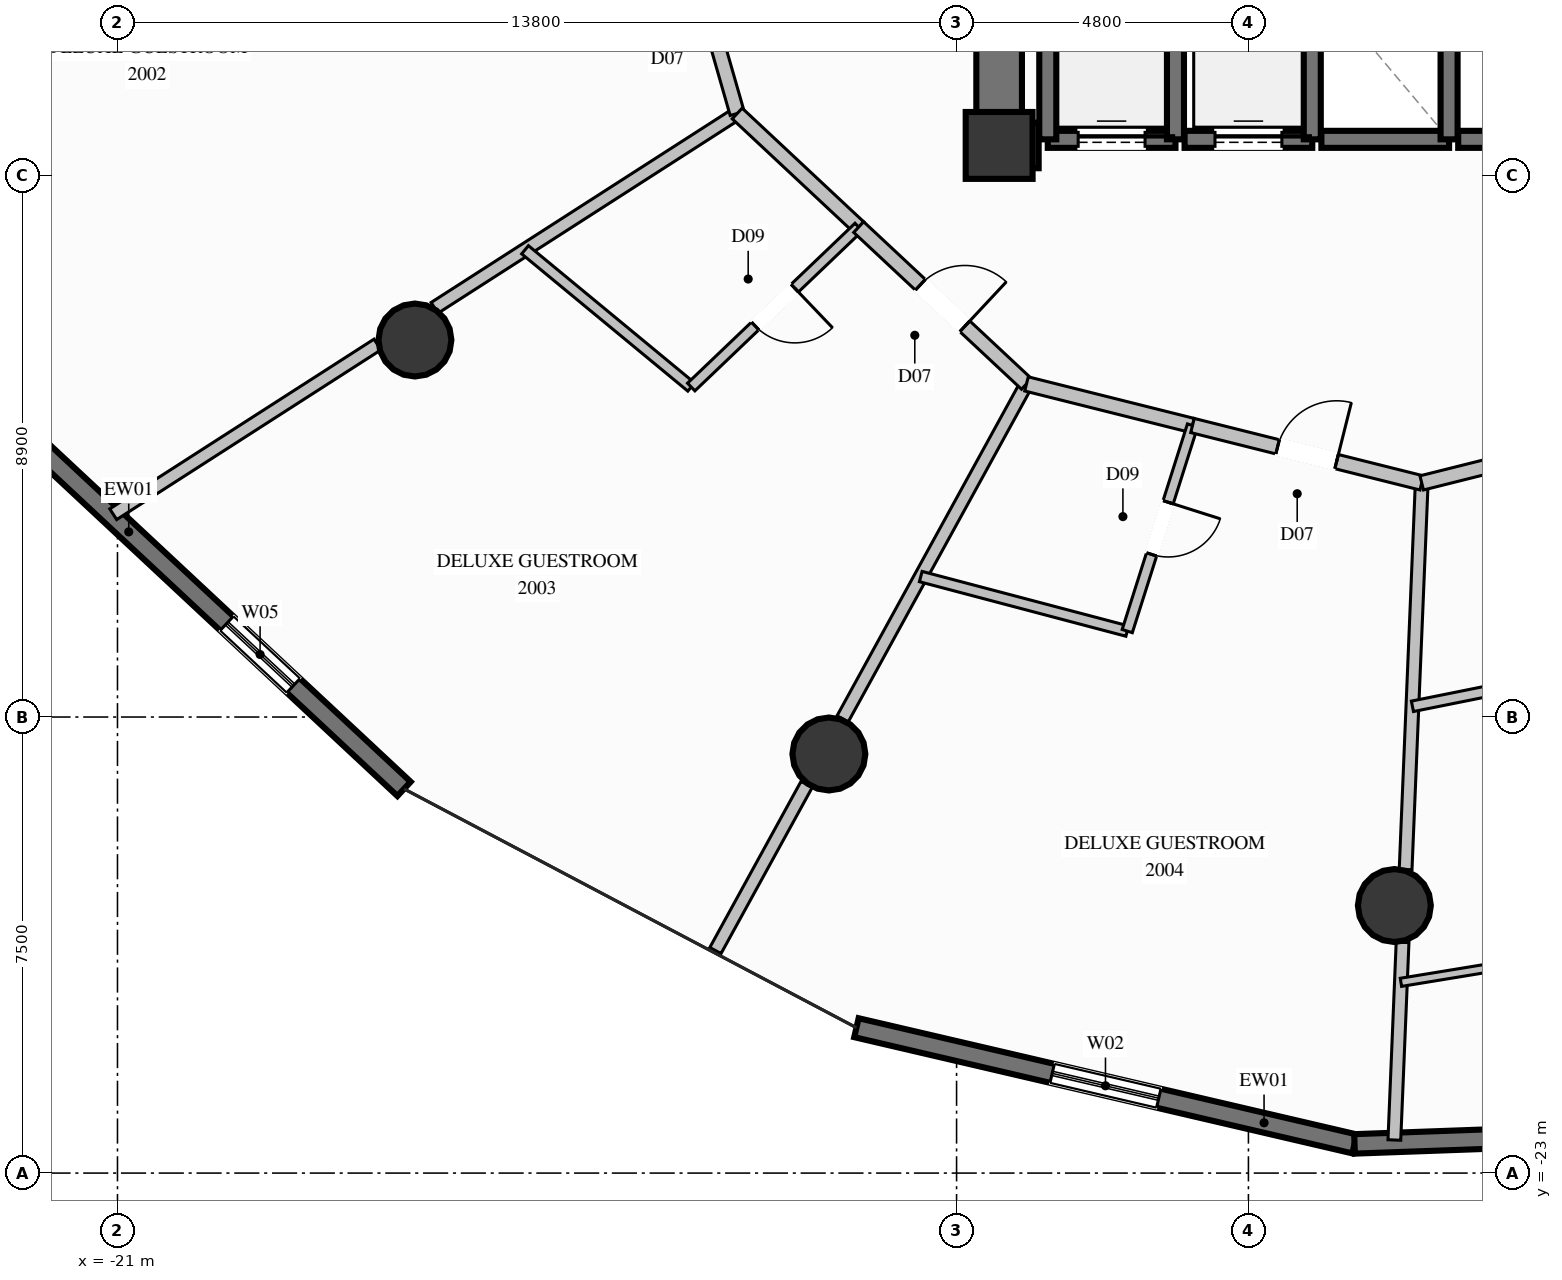
"""IFC4 building model, lengths in metres.
Left out: names, types, materials, properties, quantities, classifications, styles, units other than length and angle.
Written with IfcOpenShell. Run it as: python <this file> out.ifc"""

import sys

from ifc_helpers import new_model, si_unit, direction, frame, frame_2d, origin, origin_2d, place, context, subcontext, project, spatial, rectangle, circle, extrude, element, fill, save


model = new_model("IFC4")
c1 = context("Model", 3, precision=1e-05, world=origin(), true_north=direction((0.0, 1.0)))
c2 = subcontext(c1, "Body", "Model", "MODEL_VIEW")
j1 = project(units=[si_unit("LENGTHUNIT", "METRE"), si_unit("PLANEANGLEUNIT", "RADIAN")], contexts=[c1])
p1 = place(None, origin())
s1 = spatial("IfcSite", under=j1, at=p1, CompositionType="ELEMENT")
p2 = place(p1, origin())
s2 = spatial("IfcBuilding", under=s1, at=p2, CompositionType="ELEMENT")
p3 = place(p2, frame((0.0, 0.0, 75.2)))
s3 = spatial("IfcBuildingStorey", under=s2, at=p3, CompositionType="ELEMENT", Elevation=75.2)
p4 = place(p3, frame((-6.5, -6.1, 0.0), z_axis=(0.0, 0.0, 1.0), x_axis=(1.0, 0.0, 0.0)))
e1 = element("IfcColumn", 1, at=p4, inside=s3, PredefinedType="COLUMN", context=c2, shape_type="SweptSolid", body=[
    extrude(rectangle(XDim=1.1, YDim=1.1, at=origin_2d()), origin(), (0.0, 0.0, 1.0), 3.6),
])
p5 = place(p3, frame((-6.125, -6.1, 0.0), z_axis=(0.0, 0.0, 1.0), x_axis=(1.0, 0.0, 0.0)))
e2 = element("IfcWall", 2, at=p5, inside=s3, PredefinedType="SHEAR", context=c2, shape_type="SweptSolid", body=[
    extrude(rectangle(XDim=0.275, YDim=0.75, at=frame_2d((0.137, 0.0))), origin(), (0.0, 0.0, 1.0), 3.6),
])
p6 = place(p3, frame((-6.5, -6.475, 0.0), z_axis=(0.0, 0.0, 1.0), x_axis=(0.0, 1.0, 0.0)))
e3 = element("IfcWall", 3, at=p6, inside=s3, PredefinedType="SHEAR", context=c2, shape_type="SweptSolid", body=[
    extrude(rectangle(XDim=3.125, YDim=0.75, at=frame_2d((1.562, 0.0))), origin(), (0.0, 0.0, 1.0), 3.6),
])
for number, where, z_axis, x_axis in (
    (4, (-16.108, -9.3, 0.0), (0.0, 0.0, 1.0), (1.0, 0.0, 0.0)),
    (5, (-9.3, -16.108, 0.0), (0.0, 0.0, 1.0), (1.0, 0.0, 0.0)),
    (6, (0.0, -18.6, 0.0), (0.0, 0.0, 1.0), (1.0, 0.0, 0.0)),
):
    element("IfcColumn", number, at=place(p3, frame(where, z_axis=z_axis, x_axis=x_axis)), inside=s3, PredefinedType="COLUMN", context=c2, shape_type="SweptSolid", body=[
        extrude(circle(Radius=0.6, at=origin_2d()), origin(), (0.0, 0.0, 1.0), 3.6),
    ])
p7 = place(p3, frame((-16.287, -16.682, 0.0), z_axis=(0.0, 0.0, 1.0), x_axis=(-0.730986520917, 0.682391900771, 0.0)))
e7 = element("IfcWall", 7, at=p7, inside=s3, PredefinedType="SOLIDWALL", context=c2, shape_type="SweptSolid", body=[
    extrude(rectangle(XDim=8.149, YDim=0.32, at=frame_2d((4.074, 0.0))), origin(), (0.0, 0.0, 1.0), 3.34),
])
p8 = place(p7, frame((2.489, 0.0, 0.85)))
e8 = element("IfcOpeningElement", 8, at=p8, cuts=e7, PredefinedType="OPENING", context=c2, shape_type="SweptSolid", body=[
    extrude(rectangle(XDim=1.5, YDim=1.2, at=frame_2d((0.75, 0.6))), frame((0.0, 0.17, 0.0), z_axis=(0.0, -1.0, 0.0), x_axis=(1.0, 0.0, 0.0)), (0.0, 0.0, 1.0), 0.34),
])
p9 = place(p3, frame((-0.655, -22.52, 0.0), z_axis=(0.0, 0.0, 1.0), x_axis=(-0.973849344218, 0.227194750746, 0.0)))
e9 = element("IfcWall", 9, at=p9, inside=s3, PredefinedType="SOLIDWALL", context=c2, shape_type="SweptSolid", body=[
    extrude(rectangle(XDim=8.412, YDim=0.32, at=frame_2d((4.206, 0.0))), origin(), (0.0, 0.0, 1.0), 3.34),
])
p10 = place(p9, frame((3.306, 0.0, 0.35)))
e10 = element("IfcOpeningElement", 10, at=p10, cuts=e9, PredefinedType="OPENING", context=c2, shape_type="SweptSolid", body=[
    extrude(rectangle(XDim=1.8, YDim=2.6, at=frame_2d((0.9, 1.3))), frame((0.0, 0.17, 0.0), z_axis=(0.0, -1.0, 0.0), x_axis=(1.0, 0.0, 0.0)), (0.0, 0.0, 1.0), 0.34),
])
p11 = place(p3, frame((7.49, -22.226, 0.0), z_axis=(0.0, 0.0, 1.0), x_axis=(-0.999349428773, -0.03606548505, 0.0)))
e11 = element("IfcWall", 11, at=p11, inside=s3, PredefinedType="SOLIDWALL", context=c2, shape_type="SweptSolid", body=[
    extrude(rectangle(XDim=8.15, YDim=0.32, at=frame_2d((4.075, 0.0))), origin(), (0.0, 0.0, 1.0), 3.34),
])
p12 = place(p11, frame((2.797, 0.0, 0.35)))
e12 = element("IfcOpeningElement", 12, at=p12, cuts=e11, PredefinedType="OPENING", context=c2, shape_type="SweptSolid", body=[
    extrude(rectangle(XDim=1.8, YDim=2.6, at=frame_2d((0.9, 1.3))), frame((0.0, 0.17, 0.0), z_axis=(0.0, -1.0, 0.0), x_axis=(1.0, 0.0, 0.0)), (0.0, 0.0, 1.0), 0.34),
])
p13 = place(p3, frame((-5.7, -6.0, 0.0), z_axis=(0.0, 0.0, 1.0), x_axis=(1.0, 0.0, 0.0)))
e13 = element("IfcWall", 13, at=p13, inside=s3, PredefinedType="SOLIDWALL", context=c2, shape_type="SweptSolid", body=[
    extrude(rectangle(XDim=2.1, YDim=0.28, at=frame_2d((1.05, 0.0))), origin(), (0.0, 0.0, 1.0), 3.34),
])
p14 = place(p13, frame((0.5, 0.0, 0.0)))
e14 = element("IfcOpeningElement", 14, at=p14, cuts=e13, PredefinedType="OPENING", context=c2, shape_type="SweptSolid", body=[
    extrude(rectangle(XDim=1.1, YDim=2.2, at=frame_2d((0.55, 1.1))), frame((0.0, 0.15, 0.0), z_axis=(0.0, -1.0, 0.0), x_axis=(1.0, 0.0, 0.0)), (0.0, 0.0, 1.0), 0.3),
])
for number, where, z_axis, x_axis in (
    (15, (-5.7, -3.5, 0.0), (0.0, 0.0, 1.0), (0.0, -1.0, 0.0)),
    (16, (-3.6, -6.0, 0.0), (0.0, 0.0, 1.0), (0.0, 1.0, 0.0)),
):
    element("IfcWall", number, at=place(p3, frame(where, z_axis=z_axis, x_axis=x_axis)), inside=s3, PredefinedType="SOLIDWALL", context=c2, shape_type="SweptSolid", body=[
        extrude(rectangle(XDim=2.5, YDim=0.28, at=frame_2d((1.25, 0.0))), origin(), (0.0, 0.0, 1.0), 3.34),
    ])
p15 = place(p3, frame((-3.45, -6.0, 0.0), z_axis=(0.0, 0.0, 1.0), x_axis=(1.0, 0.0, 0.0)))
e17 = element("IfcWall", 17, at=p15, inside=s3, PredefinedType="SOLIDWALL", context=c2, shape_type="SweptSolid", body=[
    extrude(rectangle(XDim=2.1, YDim=0.28, at=frame_2d((1.05, 0.0))), origin(), (0.0, 0.0, 1.0), 3.34),
])
p16 = place(p15, frame((0.5, 0.0, 0.0)))
e18 = element("IfcOpeningElement", 18, at=p16, cuts=e17, PredefinedType="OPENING", context=c2, shape_type="SweptSolid", body=[
    extrude(rectangle(XDim=1.1, YDim=2.2, at=frame_2d((0.55, 1.1))), frame((0.0, 0.15, 0.0), z_axis=(0.0, -1.0, 0.0), x_axis=(1.0, 0.0, 0.0)), (0.0, 0.0, 1.0), 0.3),
])
p17 = place(p3, frame((-1.35, -6.0, 0.0), z_axis=(0.0, 0.0, 1.0), x_axis=(0.0, 1.0, 0.0)))
e19 = element("IfcWall", 19, at=p17, inside=s3, PredefinedType="SOLIDWALL", context=c2, shape_type="SweptSolid", body=[
    extrude(rectangle(XDim=2.5, YDim=0.28, at=frame_2d((1.25, 0.0))), origin(), (0.0, 0.0, 1.0), 3.34),
])
p18 = place(p3, frame((-1.2, -6.0, 0.0), z_axis=(0.0, 0.0, 1.0), x_axis=(1.0, 0.0, 0.0)))
e20 = element("IfcWall", 20, at=p18, inside=s3, PredefinedType="SOLIDWALL", context=c2, shape_type="SweptSolid", body=[
    extrude(rectangle(XDim=2.1, YDim=0.28, at=frame_2d((1.05, 0.0))), origin(), (0.0, 0.0, 1.0), 3.34),
])
p19 = place(p3, frame((0.9, -6.0, 0.0), z_axis=(0.0, 0.0, 1.0), x_axis=(0.0, 1.0, 0.0)))
e21 = element("IfcWall", 21, at=p19, inside=s3, PredefinedType="SOLIDWALL", context=c2, shape_type="SweptSolid", body=[
    extrude(rectangle(XDim=2.5, YDim=0.28, at=frame_2d((1.25, 0.0))), origin(), (0.0, 0.0, 1.0), 3.34),
])
p20 = place(p3, frame((1.05, -6.0, 0.0), z_axis=(0.0, 0.0, 1.0), x_axis=(1.0, 0.0, 0.0)))
e22 = element("IfcWall", 22, at=p20, inside=s3, PredefinedType="SOLIDWALL", context=c2, shape_type="SweptSolid", body=[
    extrude(rectangle(XDim=2.1, YDim=0.28, at=frame_2d((1.05, 0.0))), origin(), (0.0, 0.0, 1.0), 3.34),
])
p21 = place(p3, frame((-10.808, -5.575, 0.0), z_axis=(0.0, 0.0, 1.0), x_axis=(-0.841434537704, -0.540359064659, 0.0)))
e23 = element("IfcWall", 23, at=p21, inside=s3, PredefinedType="PARTITIONING", context=c2, shape_type="SweptSolid", body=[
    extrude(rectangle(XDim=5.915, YDim=0.21, at=frame_2d((2.957, 0.0))), origin(), (0.0, 0.0, 1.0), 2.709),
])
p22 = place(p3, frame((-16.724, -9.374, 0.0), z_axis=(0.0, 0.0, 1.0), x_axis=(-0.841425650912, -0.540372902714, 0.0)))
e24 = element("IfcWall", 24, at=p22, inside=s3, PredefinedType="PARTITIONING", context=c2, shape_type="SweptSolid", body=[
    extrude(rectangle(XDim=5.165, YDim=0.21, at=frame_2d((2.583, 0.0))), origin(), (0.0, 0.0, 1.0), 3.34),
])
p23 = place(p3, frame((-6.05, -10.022, 0.0), z_axis=(0.0, 0.0, 1.0), x_axis=(-0.481245933496, -0.876585621314, 0.0)))
e25 = element("IfcWall", 25, at=p23, inside=s3, PredefinedType="PARTITIONING", context=c2, shape_type="SweptSolid", body=[
    extrude(rectangle(XDim=6.283, YDim=0.21, at=frame_2d((3.142, 0.0))), origin(), (0.0, 0.0, 1.0), 2.709),
])
p24 = place(p3, frame((-9.666, -16.608, 0.0), z_axis=(0.0, 0.0, 1.0), x_axis=(-0.481254091613, -0.876581142454, 0.0)))
e26 = element("IfcWall", 26, at=p24, inside=s3, PredefinedType="PARTITIONING", context=c2, shape_type="SweptSolid", body=[
    extrude(rectangle(XDim=3.117, YDim=0.21, at=frame_2d((1.559, 0.0))), origin(), (0.0, 0.0, 1.0), 3.34),
])
p25 = place(p3, frame((0.45, -11.65, 0.0), z_axis=(0.0, 0.0, 1.0), x_axis=(-0.041625757429, -0.999133272551, 0.0)))
e27 = element("IfcWall", 27, at=p25, inside=s3, PredefinedType="PARTITIONING", context=c2, shape_type="SweptSolid", body=[
    extrude(rectangle(XDim=6.364, YDim=0.21, at=frame_2d((3.182, 0.0))), origin(), (0.0, 0.0, 1.0), 3.34),
])
p26 = place(p3, frame((0.135, -19.205, 0.0), z_axis=(0.0, 0.0, 1.0), x_axis=(-0.041493222314, -0.999138785406, 0.0)))
e28 = element("IfcWall", 28, at=p26, inside=s3, PredefinedType="PARTITIONING", context=c2, shape_type="SweptSolid", body=[
    extrude(rectangle(XDim=3.254, YDim=0.21, at=frame_2d((1.627, 0.0))), origin(), (0.0, 0.0, 1.0), 3.34),
])
p27 = place(p3, frame((-11.818, -2.051, 0.0), z_axis=(0.0, 0.0, 1.0), x_axis=(0.275521481409, -0.961294914832, 0.0)))
e29 = element("IfcWall", 29, at=p27, inside=s3, PredefinedType="PARTITIONING", context=c2, shape_type="SweptSolid", body=[
    extrude(rectangle(XDim=3.666, YDim=0.24, at=frame_2d((1.833, 0.0))), origin(), (0.0, 0.0, 1.0), 3.34),
])
p28 = place(p27, frame((1.333, 0.0, 0.0)))
e30 = element("IfcOpeningElement", 30, at=p28, cuts=e29, PredefinedType="OPENING", context=c2, shape_type="SweptSolid", body=[
    extrude(rectangle(XDim=1.0, YDim=2.2, at=frame_2d((0.5, 1.1))), frame((0.0, 0.13, 0.0), z_axis=(0.0, -1.0, 0.0), x_axis=(1.0, 0.0, 0.0)), (0.0, 0.0, 1.0), 0.26),
])
p29 = place(p3, frame((-10.808, -5.575, 0.0), z_axis=(0.0, 0.0, 1.0), x_axis=(0.730449499178, -0.682966711597, 0.0)))
e31 = element("IfcWall", 31, at=p29, inside=s3, PredefinedType="PARTITIONING", context=c2, shape_type="SweptSolid", body=[
    extrude(rectangle(XDim=2.735, YDim=0.24, at=frame_2d((1.368, 0.0))), origin(), (0.0, 0.0, 1.0), 3.34),
])
p30 = place(p3, frame((-14.297, -7.816, 0.0), z_axis=(0.0, 0.0, 1.0), x_axis=(0.771064668328, -0.636756843117, 0.0)))
e32 = element("IfcWall", 32, at=p30, inside=s3, PredefinedType="PLUMBINGWALL", context=c2, shape_type="SweptSolid", body=[
    extrude(rectangle(XDim=3.545, YDim=0.175, at=frame_2d((1.772, 0.0))), origin(), (0.0, 0.0, 1.0), 3.34),
])
p31 = place(p3, frame((-8.81, -7.443, 0.0), z_axis=(0.0, 0.0, 1.0), x_axis=(-0.723204148778, -0.690634316546, 0.0)))
e33 = element("IfcWall", 33, at=p31, inside=s3, PredefinedType="PLUMBINGWALL", context=c2, shape_type="SweptSolid", body=[
    extrude(rectangle(XDim=3.808, YDim=0.175, at=frame_2d((1.904, 0.0))), origin(), (0.0, 0.0, 1.0), 2.709),
])
p32 = place(p31, frame((1.454, 0.0, 0.0)))
e34 = element("IfcOpeningElement", 34, at=p32, cuts=e33, PredefinedType="OPENING", context=c2, shape_type="SweptSolid", body=[
    extrude(rectangle(XDim=0.9, YDim=2.1, at=frame_2d((0.45, 1.05))), frame((0.0, 0.098, 0.0), z_axis=(0.0, -1.0, 0.0), x_axis=(1.0, 0.0, 0.0)), (0.0, 0.0, 1.0), 0.195),
])
p33 = place(p3, frame((-8.81, -7.443, 0.0), z_axis=(0.0, 0.0, 1.0), x_axis=(0.730679025356, -0.682721145054, 0.0)))
e35 = element("IfcWall", 35, at=p33, inside=s3, PredefinedType="PARTITIONING", context=c2, shape_type="SweptSolid", body=[
    extrude(rectangle(XDim=3.777, YDim=0.24, at=frame_2d((1.889, 0.0))), origin(), (0.0, 0.0, 1.0), 3.34),
])
p34 = place(p33, frame((1.389, 0.0, 0.0)))
e36 = element("IfcOpeningElement", 36, at=p34, cuts=e35, PredefinedType="OPENING", context=c2, shape_type="SweptSolid", body=[
    extrude(rectangle(XDim=1.0, YDim=2.2, at=frame_2d((0.5, 1.1))), frame((0.0, 0.13, 0.0), z_axis=(0.0, -1.0, 0.0), x_axis=(1.0, 0.0, 0.0)), (0.0, 0.0, 1.0), 0.26),
])
p35 = place(p3, frame((-6.05, -10.022, 0.0), z_axis=(0.0, 0.0, 1.0), x_axis=(0.970009682466, -0.243066278865, 0.0)))
e37 = element("IfcWall", 37, at=p35, inside=s3, PredefinedType="PARTITIONING", context=c2, shape_type="SweptSolid", body=[
    extrude(rectangle(XDim=2.814, YDim=0.24, at=frame_2d((1.407, 0.0))), origin(), (0.0, 0.0, 1.0), 3.34),
])
p36 = place(p3, frame((-7.789, -13.19, 0.0), z_axis=(0.0, 0.0, 1.0), x_axis=(0.966843650798, -0.255369056293, 0.0)))
e38 = element("IfcWall", 38, at=p36, inside=s3, PredefinedType="PLUMBINGWALL", context=c2, shape_type="SweptSolid", body=[
    extrude(rectangle(XDim=3.512, YDim=0.175, at=frame_2d((1.756, 0.0))), origin(), (0.0, 0.0, 1.0), 3.34),
])
p37 = place(p3, frame((-3.32, -10.706, 0.0), z_axis=(0.0, 0.0, 1.0), x_axis=(-0.302504693794, -0.953147895257, 0.0)))
e39 = element("IfcWall", 39, at=p37, inside=s3, PredefinedType="PLUMBINGWALL", context=c2, shape_type="SweptSolid", body=[
    extrude(rectangle(XDim=3.547, YDim=0.175, at=frame_2d((1.773, 0.0))), origin(), (0.0, 0.0, 1.0), 3.34),
])
p38 = place(p37, frame((1.324, 0.0, 0.0)))
e40 = element("IfcOpeningElement", 40, at=p38, cuts=e39, PredefinedType="OPENING", context=c2, shape_type="SweptSolid", body=[
    extrude(rectangle(XDim=0.9, YDim=2.1, at=frame_2d((0.45, 1.05))), frame((0.0, 0.098, 0.0), z_axis=(0.0, -1.0, 0.0), x_axis=(1.0, 0.0, 0.0)), (0.0, 0.0, 1.0), 0.195),
])
p39 = place(p3, frame((-3.32, -10.706, 0.0), z_axis=(0.0, 0.0, 1.0), x_axis=(0.970061149619, -0.24286079552, 0.0)))
e41 = element("IfcWall", 41, at=p39, inside=s3, PredefinedType="PARTITIONING", context=c2, shape_type="SweptSolid", body=[
    extrude(rectangle(XDim=3.886, YDim=0.24, at=frame_2d((1.943, 0.0))), origin(), (0.0, 0.0, 1.0), 3.34),
])
p40 = place(p39, frame((1.443, 0.0, 0.0)))
e42 = element("IfcOpeningElement", 42, at=p40, cuts=e41, PredefinedType="OPENING", context=c2, shape_type="SweptSolid", body=[
    extrude(rectangle(XDim=1.0, YDim=2.2, at=frame_2d((0.5, 1.1))), frame((0.0, 0.13, 0.0), z_axis=(0.0, -1.0, 0.0), x_axis=(1.0, 0.0, 0.0)), (0.0, 0.0, 1.0), 0.26),
])
p41 = place(p3, frame((0.45, -11.65, 0.0), z_axis=(0.0, 0.0, 1.0), x_axis=(0.97003013248, 0.242984654004, 0.0)))
e43 = element("IfcWall", 43, at=p41, inside=s3, PredefinedType="PARTITIONING", context=c2, shape_type="SweptSolid", body=[
    extrude(rectangle(XDim=2.814, YDim=0.24, at=frame_2d((1.407, 0.0))), origin(), (0.0, 0.0, 1.0), 3.34),
])
p42 = place(p3, frame((0.297, -15.324, 0.0), z_axis=(0.0, 0.0, 1.0), x_axis=(0.980380660632, 0.197113571979, 0.0)))
e44 = element("IfcWall", 44, at=p42, inside=s3, PredefinedType="PLUMBINGWALL", context=c2, shape_type="SweptSolid", body=[
    extrude(rectangle(XDim=3.577, YDim=0.175, at=frame_2d((1.789, 0.0))), origin(), (0.0, 0.0, 1.0), 3.34),
])
p43 = place(p3, frame((0.108, -19.863, 0.0), z_axis=(0.0, 0.0, 1.0), x_axis=(0.986847521354, 0.161653857356, 0.0)))
e45 = element("IfcWall", 45, at=p43, inside=s3, PredefinedType="PARTITIONING", context=c2, shape_type="SweptSolid", body=[
    extrude(rectangle(XDim=10.776, YDim=0.135, at=frame_2d((5.388, 0.0))), origin(), (0.0, 0.0, 1.0), 3.34),
])
p44 = place(p43, frame((4.913, 0.0, 0.0)))
e46 = element("IfcOpeningElement", 46, at=p44, cuts=e45, PredefinedType="OPENING", context=c2, shape_type="SweptSolid", body=[
    extrude(rectangle(XDim=0.95, YDim=2.1, at=frame_2d((0.475, 1.05))), frame((0.0, 0.078, 0.0), z_axis=(0.0, -1.0, 0.0), x_axis=(1.0, 0.0, 0.0)), (0.0, 0.0, 1.0), 0.155),
])
p45 = place(p8, origin())
e47 = element("IfcWindow", 47, at=p45, inside=s3, PartitioningType="SINGLE_PANEL", PredefinedType="WINDOW", context=c2, shape_type="SweptSolid", body=[
    extrude(rectangle(XDim=1.5, YDim=1.2, at=frame_2d((0.75, 0.6))), frame((0.0, 0.03, 0.0), z_axis=(0.0, -1.0, 0.0), x_axis=(1.0, 0.0, 0.0)), (0.0, 0.0, 1.0), 0.06),
])
fill(e8, e47)
p46 = place(p10, origin())
e48 = element("IfcWindow", 48, at=p46, inside=s3, PartitioningType="SINGLE_PANEL", PredefinedType="WINDOW", context=c2, shape_type="SweptSolid", body=[
    extrude(rectangle(XDim=1.8, YDim=2.6, at=frame_2d((0.9, 1.3))), frame((0.0, 0.03, 0.0), z_axis=(0.0, -1.0, 0.0), x_axis=(1.0, 0.0, 0.0)), (0.0, 0.0, 1.0), 0.06),
])
fill(e10, e48)
p47 = place(p14, origin())
e49 = element("IfcDoor", 49, at=p47, inside=s3, OperationType="SLIDING_TO_LEFT", PredefinedType="DOOR", context=c2, shape_type="SweptSolid", body=[
    extrude(rectangle(XDim=1.1, YDim=2.2, at=frame_2d((0.55, 1.1))), frame((0.0, 0.025, 0.0), z_axis=(0.0, -1.0, 0.0), x_axis=(1.0, 0.0, 0.0)), (0.0, 0.0, 1.0), 0.05),
])
fill(e14, e49)
p48 = place(p16, origin())
e50 = element("IfcDoor", 50, at=p48, inside=s3, OperationType="SLIDING_TO_LEFT", PredefinedType="DOOR", context=c2, shape_type="SweptSolid", body=[
    extrude(rectangle(XDim=1.1, YDim=2.2, at=frame_2d((0.55, 1.1))), frame((0.0, 0.025, 0.0), z_axis=(0.0, -1.0, 0.0), x_axis=(1.0, 0.0, 0.0)), (0.0, 0.0, 1.0), 0.05),
])
fill(e18, e50)
p49 = place(p32, origin())
e51 = element("IfcDoor", 51, at=p49, inside=s3, OperationType="SINGLE_SWING_LEFT", PredefinedType="DOOR", context=c2, shape_type="SweptSolid", body=[
    extrude(rectangle(XDim=0.9, YDim=2.1, at=frame_2d((0.45, 1.05))), frame((0.0, 0.025, 0.0), z_axis=(0.0, -1.0, 0.0), x_axis=(1.0, 0.0, 0.0)), (0.0, 0.0, 1.0), 0.05),
])
fill(e34, e51)
p50 = place(p34, origin())
e52 = element("IfcDoor", 52, at=p50, inside=s3, OperationType="SINGLE_SWING_RIGHT", PredefinedType="DOOR", context=c2, shape_type="SweptSolid", body=[
    extrude(rectangle(XDim=1.0, YDim=2.2, at=frame_2d((0.5, 1.1))), frame((0.0, 0.025, 0.0), z_axis=(0.0, -1.0, 0.0), x_axis=(1.0, 0.0, 0.0)), (0.0, 0.0, 1.0), 0.05),
])
fill(e36, e52)
p51 = place(p38, origin())
e53 = element("IfcDoor", 53, at=p51, inside=s3, OperationType="SINGLE_SWING_LEFT", PredefinedType="DOOR", context=c2, shape_type="SweptSolid", body=[
    extrude(rectangle(XDim=0.9, YDim=2.1, at=frame_2d((0.45, 1.05))), frame((0.0, 0.025, 0.0), z_axis=(0.0, -1.0, 0.0), x_axis=(1.0, 0.0, 0.0)), (0.0, 0.0, 1.0), 0.05),
])
fill(e40, e53)
p52 = place(p40, origin())
e54 = element("IfcDoor", 54, at=p52, inside=s3, OperationType="SINGLE_SWING_RIGHT", PredefinedType="DOOR", context=c2, shape_type="SweptSolid", body=[
    extrude(rectangle(XDim=1.0, YDim=2.2, at=frame_2d((0.5, 1.1))), frame((0.0, 0.025, 0.0), z_axis=(0.0, -1.0, 0.0), x_axis=(1.0, 0.0, 0.0)), (0.0, 0.0, 1.0), 0.05),
])
fill(e42, e54)
save(model, sys.argv[1])
